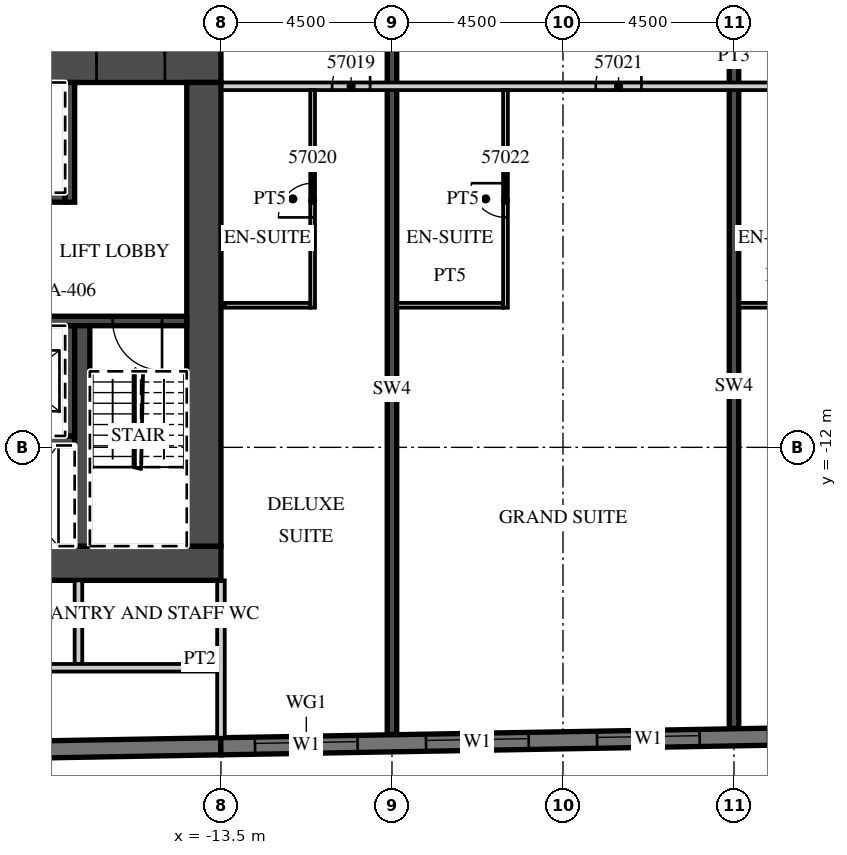
"""IFC4 building model, lengths in metres.
Left out: names, types, materials, properties, quantities, classifications, styles, units other than length and angle.
Written with IfcOpenShell. Run it as: python <this file> out.ifc"""

import sys

from ifc_helpers import new_model, si_unit, direction, frame, frame_2d, origin, place, context, subcontext, project, spatial, rectangle, extrude, element, fill, save


model = new_model("IFC4")
c1 = context("Model", 3, precision=1e-05, world=origin(), true_north=direction((0.0, 1.0)))
c2 = subcontext(c1, "Body", "Model", "MODEL_VIEW")
j1 = project(units=[si_unit("LENGTHUNIT", "METRE"), si_unit("PLANEANGLEUNIT", "RADIAN")], contexts=[c1])
p1 = place(None, origin())
s1 = spatial("IfcSite", under=j1, at=p1, CompositionType="ELEMENT")
p2 = place(p1, origin())
s2 = spatial("IfcBuilding", under=s1, at=p2, CompositionType="ELEMENT")
p3 = place(p2, frame((0.0, 0.0, 234.2)))
s3 = spatial("IfcBuildingStorey", under=s2, at=p3, CompositionType="ELEMENT", Elevation=234.2)
p4 = place(p3, frame((-9.0, -19.55, 0.0), z_axis=(0.0, 0.0, 1.0), x_axis=(0.0, 1.0, 0.0)))
e1 = element("IfcWall", 1, at=p4, inside=s3, PredefinedType="SHEAR", context=c2, shape_type="SweptSolid", body=[
    extrude(rectangle(XDim=18.15, YDim=0.25, at=frame_2d((9.075, 0.0))), origin(), (0.0, 0.0, 1.0), 3.3),
])
p5 = place(p3, frame((0.0, -19.393, 0.0), z_axis=(0.0, 0.0, 1.0), x_axis=(0.0, 1.0, 0.0)))
e2 = element("IfcWall", 2, at=p5, inside=s3, PredefinedType="SHEAR", context=c2, shape_type="SweptSolid", body=[
    extrude(rectangle(XDim=17.993, YDim=0.25, at=frame_2d((8.997, 0.0))), origin(), (0.0, 0.0, 1.0), 3.3),
])
p6 = place(p3, frame((-31.504, -20.18, 0.0), z_axis=(0.0, 0.0, 1.0), x_axis=(0.999847677887, 0.017453395744, 0.0)))
e3 = element("IfcWall", 3, at=p6, inside=s3, PredefinedType="SOLIDWALL", context=c2, shape_type="SweptSolid", body=[
    extrude(rectangle(XDim=18.003, YDim=0.45, at=frame_2d((9.001, 0.0))), origin(), (0.0, 0.0, 1.0), 3.02),
])
p7 = place(p3, frame((-13.504, -19.866, 0.0), z_axis=(0.0, 0.0, 1.0), x_axis=(0.999847672978, 0.017453676992, 0.0)))
e4 = element("IfcWall", 4, at=p7, inside=s3, PredefinedType="SOLIDWALL", context=c2, shape_type="SweptSolid", body=[
    extrude(rectangle(XDim=52.86, YDim=0.45, at=frame_2d((26.43, 0.0))), origin(), (0.0, 0.0, 1.0), 3.02),
])
p8 = place(p7, frame((0.9, 0.0, 0.45)))
e5 = element("IfcOpeningElement", 5, at=p8, cuts=e4, PredefinedType="OPENING", context=c2, shape_type="SweptSolid", body=[
    extrude(rectangle(XDim=2.7, YDim=2.25, at=frame_2d((1.35, 1.125))), frame((0.0, 0.235, 0.0), z_axis=(0.0, -1.0, 0.0), x_axis=(1.0, 0.0, 0.0)), (0.0, 0.0, 1.0), 0.47),
])
p9 = place(p7, frame((5.401, 0.0, 0.45)))
e6 = element("IfcOpeningElement", 6, at=p9, cuts=e4, PredefinedType="OPENING", context=c2, shape_type="SweptSolid", body=[
    extrude(rectangle(XDim=2.7, YDim=2.25, at=frame_2d((1.35, 1.125))), frame((0.0, 0.235, 0.0), z_axis=(0.0, -1.0, 0.0), x_axis=(1.0, 0.0, 0.0)), (0.0, 0.0, 1.0), 0.47),
])
p10 = place(p7, frame((9.902, 0.0, 0.45)))
e7 = element("IfcOpeningElement", 7, at=p10, cuts=e4, PredefinedType="OPENING", context=c2, shape_type="SweptSolid", body=[
    extrude(rectangle(XDim=2.7, YDim=2.25, at=frame_2d((1.35, 1.125))), frame((0.0, 0.235, 0.0), z_axis=(0.0, -1.0, 0.0), x_axis=(1.0, 0.0, 0.0)), (0.0, 0.0, 1.0), 0.47),
])
p11 = place(p7, frame((14.402, 0.0, 0.45)))
e8 = element("IfcOpeningElement", 8, at=p11, cuts=e4, PredefinedType="OPENING", context=c2, shape_type="SweptSolid", body=[
    extrude(rectangle(XDim=2.7, YDim=2.25, at=frame_2d((1.35, 1.125))), frame((0.0, 0.235, 0.0), z_axis=(0.0, -1.0, 0.0), x_axis=(1.0, 0.0, 0.0)), (0.0, 0.0, 1.0), 0.47),
])
p12 = place(p7, frame((18.903, 0.0, 0.45)))
e9 = element("IfcOpeningElement", 9, at=p12, cuts=e4, PredefinedType="OPENING", context=c2, shape_type="SweptSolid", body=[
    extrude(rectangle(XDim=2.7, YDim=2.25, at=frame_2d((1.35, 1.125))), frame((0.0, 0.235, 0.0), z_axis=(0.0, -1.0, 0.0), x_axis=(1.0, 0.0, 0.0)), (0.0, 0.0, 1.0), 0.47),
])
p13 = place(p7, frame((23.404, 0.0, 0.45)))
e10 = element("IfcOpeningElement", 10, at=p13, cuts=e4, PredefinedType="OPENING", context=c2, shape_type="SweptSolid", body=[
    extrude(rectangle(XDim=2.7, YDim=2.25, at=frame_2d((1.35, 1.125))), frame((0.0, 0.235, 0.0), z_axis=(0.0, -1.0, 0.0), x_axis=(1.0, 0.0, 0.0)), (0.0, 0.0, 1.0), 0.47),
])
p14 = place(p7, frame((27.904, 0.0, 0.45)))
e11 = element("IfcOpeningElement", 11, at=p14, cuts=e4, PredefinedType="OPENING", context=c2, shape_type="SweptSolid", body=[
    extrude(rectangle(XDim=2.7, YDim=2.25, at=frame_2d((1.35, 1.125))), frame((0.0, 0.235, 0.0), z_axis=(0.0, -1.0, 0.0), x_axis=(1.0, 0.0, 0.0)), (0.0, 0.0, 1.0), 0.47),
])
p15 = place(p7, frame((32.405, 0.0, 0.45)))
e12 = element("IfcOpeningElement", 12, at=p15, cuts=e4, PredefinedType="OPENING", context=c2, shape_type="SweptSolid", body=[
    extrude(rectangle(XDim=2.7, YDim=2.25, at=frame_2d((1.35, 1.125))), frame((0.0, 0.235, 0.0), z_axis=(0.0, -1.0, 0.0), x_axis=(1.0, 0.0, 0.0)), (0.0, 0.0, 1.0), 0.47),
])
p16 = place(p7, frame((36.906, 0.0, 0.45)))
e13 = element("IfcOpeningElement", 13, at=p16, cuts=e4, PredefinedType="OPENING", context=c2, shape_type="SweptSolid", body=[
    extrude(rectangle(XDim=2.7, YDim=2.25, at=frame_2d((1.35, 1.125))), frame((0.0, 0.235, 0.0), z_axis=(0.0, -1.0, 0.0), x_axis=(1.0, 0.0, 0.0)), (0.0, 0.0, 1.0), 0.47),
])
p17 = place(p7, frame((41.406, 0.0, 0.45)))
e14 = element("IfcOpeningElement", 14, at=p17, cuts=e4, PredefinedType="OPENING", context=c2, shape_type="SweptSolid", body=[
    extrude(rectangle(XDim=2.7, YDim=2.25, at=frame_2d((1.35, 1.125))), frame((0.0, 0.235, 0.0), z_axis=(0.0, -1.0, 0.0), x_axis=(1.0, 0.0, 0.0)), (0.0, 0.0, 1.0), 0.47),
])
p18 = place(p7, frame((45.907, 0.0, 0.45)))
e15 = element("IfcOpeningElement", 15, at=p18, cuts=e4, PredefinedType="OPENING", context=c2, shape_type="SweptSolid", body=[
    extrude(rectangle(XDim=2.7, YDim=2.25, at=frame_2d((1.35, 1.125))), frame((0.0, 0.235, 0.0), z_axis=(0.0, -1.0, 0.0), x_axis=(1.0, 0.0, 0.0)), (0.0, 0.0, 1.0), 0.47),
])
p19 = place(p3, frame((-13.5, -19.641, 0.0), z_axis=(0.0, 0.0, 1.0), x_axis=(0.0, 1.0, 0.0)))
e16 = element("IfcWall", 16, at=p19, inside=s3, PredefinedType="PARTITIONING", context=c2, shape_type="SweptSolid", body=[
    extrude(rectangle(XDim=4.141, YDim=0.2, at=frame_2d((2.071, 0.0))), origin(), (0.0, 0.0, 1.0), 3.02),
])
p20 = place(p3, frame((-13.5, -2.5, 0.0), z_axis=(0.0, 0.0, 1.0), x_axis=(1.0, 0.0, 0.0)))
e17 = element("IfcWall", 17, at=p20, inside=s3, PredefinedType="PARTITIONING", context=c2, shape_type="SweptSolid", body=[
    extrude(rectangle(XDim=27.0, YDim=0.2, at=frame_2d((13.5, 0.0))), origin(), (0.0, 0.0, 1.0), 3.02),
])
p21 = place(p20, frame((2.925, 0.0, 0.0)))
e18 = element("IfcOpeningElement", 18, at=p21, cuts=e17, PredefinedType="OPENING", context=c2, shape_type="SweptSolid", body=[
    extrude(rectangle(XDim=1.0, YDim=2.1, at=frame_2d((0.5, 1.05))), frame((0.0, 0.11, 0.0), z_axis=(0.0, -1.0, 0.0), x_axis=(1.0, 0.0, 0.0)), (0.0, 0.0, 1.0), 0.22),
])
p22 = place(p20, frame((9.863, 0.0, 0.0)))
e19 = element("IfcOpeningElement", 19, at=p22, cuts=e17, PredefinedType="OPENING", context=c2, shape_type="SweptSolid", body=[
    extrude(rectangle(XDim=1.2, YDim=2.1, at=frame_2d((0.6, 1.05))), frame((0.0, 0.11, 0.0), z_axis=(0.0, -1.0, 0.0), x_axis=(1.0, 0.0, 0.0)), (0.0, 0.0, 1.0), 0.22),
])
p23 = place(p20, frame((16.45, 0.0, 0.0)))
e20 = element("IfcOpeningElement", 20, at=p23, cuts=e17, PredefinedType="OPENING", context=c2, shape_type="SweptSolid", body=[
    extrude(rectangle(XDim=1.0, YDim=2.1, at=frame_2d((0.5, 1.05))), frame((0.0, 0.11, 0.0), z_axis=(0.0, -1.0, 0.0), x_axis=(1.0, 0.0, 0.0)), (0.0, 0.0, 1.0), 0.22),
])
p24 = place(p20, frame((20.925, 0.0, 0.0)))
e21 = element("IfcOpeningElement", 21, at=p24, cuts=e17, PredefinedType="OPENING", context=c2, shape_type="SweptSolid", body=[
    extrude(rectangle(XDim=1.0, YDim=2.1, at=frame_2d((0.5, 1.05))), frame((0.0, 0.11, 0.0), z_axis=(0.0, -1.0, 0.0), x_axis=(1.0, 0.0, 0.0)), (0.0, 0.0, 1.0), 0.22),
])
p25 = place(p20, frame((25.425, 0.0, 0.0)))
e22 = element("IfcOpeningElement", 22, at=p25, cuts=e17, PredefinedType="OPENING", context=c2, shape_type="SweptSolid", body=[
    extrude(rectangle(XDim=1.0, YDim=2.1, at=frame_2d((0.5, 1.05))), frame((0.0, 0.11, 0.0), z_axis=(0.0, -1.0, 0.0), x_axis=(1.0, 0.0, 0.0)), (0.0, 0.0, 1.0), 0.22),
])
p26 = place(p3, frame((-11.088, -8.325, 0.0), z_axis=(0.0, 0.0, 1.0), x_axis=(0.0, 1.0, 0.0)))
e23 = element("IfcWall", 23, at=p26, inside=s3, PredefinedType="PARTITIONING", context=c2, shape_type="SweptSolid", body=[
    extrude(rectangle(XDim=5.725, YDim=0.125, at=frame_2d((2.862, 0.0))), origin(), (0.0, 0.0, 1.0), 3.02),
])
p27 = place(p26, frame((2.375, 0.0, 0.0)))
e24 = element("IfcOpeningElement", 24, at=p27, cuts=e23, PredefinedType="OPENING", context=c2, shape_type="SweptSolid", body=[
    extrude(rectangle(XDim=0.9, YDim=2.1, at=frame_2d((0.45, 1.05))), frame((0.0, 0.073, 0.0), z_axis=(0.0, -1.0, 0.0), x_axis=(1.0, 0.0, 0.0)), (0.0, 0.0, 1.0), 0.145),
])
p28 = place(p3, frame((-13.4, -8.262, 0.0), z_axis=(0.0, 0.0, 1.0), x_axis=(1.0, 0.0, 0.0)))
e25 = element("IfcWall", 25, at=p28, inside=s3, PredefinedType="PARTITIONING", context=c2, shape_type="SweptSolid", body=[
    extrude(rectangle(XDim=2.25, YDim=0.125, at=frame_2d((1.125, 0.0))), origin(), (0.0, 0.0, 1.0), 3.02),
])
p29 = place(p3, frame((-6.013, -8.325, 0.0), z_axis=(0.0, 0.0, 1.0), x_axis=(0.0, 1.0, 0.0)))
e26 = element("IfcWall", 26, at=p29, inside=s3, PredefinedType="PARTITIONING", context=c2, shape_type="SweptSolid", body=[
    extrude(rectangle(XDim=5.725, YDim=0.125, at=frame_2d((2.862, 0.0))), origin(), (0.0, 0.0, 1.0), 3.02),
])
p30 = place(p29, frame((2.375, 0.0, 0.0)))
e27 = element("IfcOpeningElement", 27, at=p30, cuts=e26, PredefinedType="OPENING", context=c2, shape_type="SweptSolid", body=[
    extrude(rectangle(XDim=0.9, YDim=2.1, at=frame_2d((0.45, 1.05))), frame((0.0, 0.073, 0.0), z_axis=(0.0, -1.0, 0.0), x_axis=(1.0, 0.0, 0.0)), (0.0, 0.0, 1.0), 0.145),
])
p31 = place(p3, frame((-8.875, -8.262, 0.0), z_axis=(0.0, 0.0, 1.0), x_axis=(1.0, 0.0, 0.0)))
e28 = element("IfcWall", 28, at=p31, inside=s3, PredefinedType="PARTITIONING", context=c2, shape_type="SweptSolid", body=[
    extrude(rectangle(XDim=2.8, YDim=0.125, at=frame_2d((1.4, 0.0))), origin(), (0.0, 0.0, 1.0), 3.02),
])
p32 = place(p3, frame((0.125, -8.262, 0.0), z_axis=(0.0, 0.0, 1.0), x_axis=(1.0, 0.0, 0.0)))
e29 = element("IfcWall", 29, at=p32, inside=s3, PredefinedType="PARTITIONING", context=c2, shape_type="SweptSolid", body=[
    extrude(rectangle(XDim=2.25, YDim=0.125, at=frame_2d((1.125, 0.0))), origin(), (0.0, 0.0, 1.0), 3.02),
])
p33 = place(p3, frame((-31.5, -1.95, 0.0), z_axis=(0.0, 0.0, 1.0), x_axis=(1.0, 0.0, 0.0)))
e30 = element("IfcWall", 30, at=p33, inside=s3, PredefinedType="SHEAR", context=c2, shape_type="SweptSolid", body=[
    extrude(rectangle(XDim=18.0, YDim=0.9, at=frame_2d((9.0, 0.0))), origin(), (0.0, 0.0, 1.0), 3.02),
])
p34 = place(p33, frame((14.725, 0.0, 0.0)))
e31 = element("IfcOpeningElement", 31, at=p34, cuts=e30, PredefinedType="OPENING", context=c2, shape_type="SweptSolid", body=[
    extrude(rectangle(XDim=1.8, YDim=2.1, at=frame_2d((0.9, 1.05))), frame((0.0, 0.46, 0.0), z_axis=(0.0, -1.0, 0.0), x_axis=(1.0, 0.0, 0.0)), (0.0, 0.0, 1.0), 0.92),
])
p35 = place(p3, frame((-20.3, -15.05, 0.0), z_axis=(0.0, 0.0, 1.0), x_axis=(1.0, 0.0, 0.0)))
e32 = element("IfcWall", 32, at=p35, inside=s3, PredefinedType="SHEAR", context=c2, shape_type="SweptSolid", body=[
    extrude(rectangle(XDim=6.8, YDim=0.9, at=frame_2d((3.4, 0.0))), origin(), (0.0, 0.0, 1.0), 3.02),
])
p36 = place(p35, frame((0.875, 0.0, 0.0)))
e33 = element("IfcOpeningElement", 33, at=p36, cuts=e32, PredefinedType="OPENING", context=c2, shape_type="SweptSolid", body=[
    extrude(rectangle(XDim=1.2, YDim=2.1, at=frame_2d((0.6, 1.05))), frame((0.0, 0.46, 0.0), z_axis=(0.0, -1.0, 0.0), x_axis=(1.0, 0.0, 0.0)), (0.0, 0.0, 1.0), 0.92),
])
p37 = place(p3, frame((-13.95, -14.6, 0.0), z_axis=(0.0, 0.0, 1.0), x_axis=(0.0, 1.0, 0.0)))
e34 = element("IfcWall", 34, at=p37, inside=s3, PredefinedType="SHEAR", context=c2, shape_type="SweptSolid", body=[
    extrude(rectangle(XDim=12.2, YDim=0.9, at=frame_2d((6.1, 0.0))), origin(), (0.0, 0.0, 1.0), 3.02),
])
p38 = place(p3, frame((-30.6, -5.425, 0.0), z_axis=(0.0, 0.0, 1.0), x_axis=(1.0, 0.0, 0.0)))
e35 = element("IfcWall", 35, at=p38, inside=s3, PredefinedType="SHEAR", context=c2, shape_type="SweptSolid", body=[
    extrude(rectangle(XDim=13.0, YDim=0.25, at=frame_2d((6.5, 0.0))), origin(), (0.0, 0.0, 1.0), 3.02),
])
p39 = place(p38, frame((3.325, 0.0, 0.0)))
e36 = element("IfcOpeningElement", 36, at=p39, cuts=e35, PredefinedType="OPENING", context=c2, shape_type="SweptSolid", body=[
    extrude(rectangle(XDim=1.2, YDim=2.1, at=frame_2d((0.6, 1.05))), frame((0.0, 0.135, 0.0), z_axis=(0.0, -1.0, 0.0), x_axis=(1.0, 0.0, 0.0)), (0.0, 0.0, 1.0), 0.27),
])
p40 = place(p38, frame((5.925, 0.0, 0.0)))
e37 = element("IfcOpeningElement", 37, at=p40, cuts=e35, PredefinedType="OPENING", context=c2, shape_type="SweptSolid", body=[
    extrude(rectangle(XDim=1.2, YDim=2.1, at=frame_2d((0.6, 1.05))), frame((0.0, 0.135, 0.0), z_axis=(0.0, -1.0, 0.0), x_axis=(1.0, 0.0, 0.0)), (0.0, 0.0, 1.0), 0.27),
])
p41 = place(p3, frame((-17.475, -5.55, 0.0), z_axis=(0.0, 0.0, 1.0), x_axis=(0.0, 1.0, 0.0)))
e38 = element("IfcWall", 38, at=p41, inside=s3, PredefinedType="SHEAR", context=c2, shape_type="SweptSolid", body=[
    extrude(rectangle(XDim=3.15, YDim=0.25, at=frame_2d((1.575, 0.0))), origin(), (0.0, 0.0, 1.0), 3.02),
])
p42 = place(p3, frame((-30.6, -8.675, 0.0), z_axis=(0.0, 0.0, 1.0), x_axis=(1.0, 0.0, 0.0)))
e39 = element("IfcWall", 39, at=p42, inside=s3, PredefinedType="SHEAR", context=c2, shape_type="SweptSolid", body=[
    extrude(rectangle(XDim=16.2, YDim=0.25, at=frame_2d((8.1, 0.0))), origin(), (0.0, 0.0, 1.0), 3.02),
])
p43 = place(p42, frame((8.55, 0.0, 0.0)))
e40 = element("IfcOpeningElement", 40, at=p43, cuts=e39, PredefinedType="OPENING", context=c2, shape_type="SweptSolid", body=[
    extrude(rectangle(XDim=1.2, YDim=2.1, at=frame_2d((0.6, 1.05))), frame((0.0, 0.135, 0.0), z_axis=(0.0, -1.0, 0.0), x_axis=(1.0, 0.0, 0.0)), (0.0, 0.0, 1.0), 0.27),
])
p44 = place(p42, frame((11.2, 0.0, 0.0)))
e41 = element("IfcOpeningElement", 41, at=p44, cuts=e39, PredefinedType="OPENING", context=c2, shape_type="SweptSolid", body=[
    extrude(rectangle(XDim=1.2, YDim=2.1, at=frame_2d((0.6, 1.05))), frame((0.0, 0.135, 0.0), z_axis=(0.0, -1.0, 0.0), x_axis=(1.0, 0.0, 0.0)), (0.0, 0.0, 1.0), 0.27),
])
p45 = place(p42, frame((14.25, 0.0, 0.0)))
e42 = element("IfcOpeningElement", 42, at=p45, cuts=e39, PredefinedType="OPENING", context=c2, shape_type="SweptSolid", body=[
    extrude(rectangle(XDim=1.3, YDim=2.1, at=frame_2d((0.65, 1.05))), frame((0.0, 0.135, 0.0), z_axis=(0.0, -1.0, 0.0), x_axis=(1.0, 0.0, 0.0)), (0.0, 0.0, 1.0), 0.27),
])
p46 = place(p42, frame((1.288, 0.0, 0.0)))
e43 = element("IfcOpeningElement", 43, at=p46, cuts=e39, PredefinedType="OPENING", context=c2, shape_type="SweptSolid", body=[
    extrude(rectangle(XDim=1.0, YDim=2.1, at=frame_2d((0.5, 1.05))), frame((0.0, 0.135, 0.0), z_axis=(0.0, -1.0, 0.0), x_axis=(1.0, 0.0, 0.0)), (0.0, 0.0, 1.0), 0.27),
])
p47 = place(p42, frame((5.262, 0.0, 0.0)))
e44 = element("IfcOpeningElement", 44, at=p47, cuts=e39, PredefinedType="OPENING", context=c2, shape_type="SweptSolid", body=[
    extrude(rectangle(XDim=1.0, YDim=2.1, at=frame_2d((0.5, 1.05))), frame((0.0, 0.135, 0.0), z_axis=(0.0, -1.0, 0.0), x_axis=(1.0, 0.0, 0.0)), (0.0, 0.0, 1.0), 0.27),
])
p48 = place(p3, frame((-30.6, -11.825, 0.0), z_axis=(0.0, 0.0, 1.0), x_axis=(1.0, 0.0, 0.0)))
e45 = element("IfcWall", 45, at=p48, inside=s3, PredefinedType="SHEAR", context=c2, shape_type="SweptSolid", body=[
    extrude(rectangle(XDim=13.25, YDim=0.25, at=frame_2d((6.625, 0.0))), origin(), (0.0, 0.0, 1.0), 3.02),
])
p49 = place(p3, frame((-17.475, -11.7, 0.0), z_axis=(0.0, 0.0, 1.0), x_axis=(0.0, 1.0, 0.0)))
e46 = element("IfcWall", 46, at=p49, inside=s3, PredefinedType="SHEAR", context=c2, shape_type="SweptSolid", body=[
    extrude(rectangle(XDim=2.9, YDim=0.25, at=frame_2d((1.45, 0.0))), origin(), (0.0, 0.0, 1.0), 3.02),
])
p50 = place(p3, frame((-17.15, -14.6, 0.0), z_axis=(0.0, 0.0, 1.0), x_axis=(0.0, 1.0, 0.0)))
e47 = element("IfcWall", 47, at=p50, inside=s3, PredefinedType="SHEAR", context=c2, shape_type="SweptSolid", body=[
    extrude(rectangle(XDim=5.8, YDim=0.4, at=frame_2d((2.9, 0.0))), origin(), (0.0, 0.0, 1.0), 3.02),
])
p51 = place(p3, frame((-17.25, -17.7, 0.0), z_axis=(0.0, 0.0, 1.0), x_axis=(0.0, 1.0, 0.0)))
e48 = element("IfcWall", 48, at=p51, inside=s3, PredefinedType="PARTITIONING", context=c2, shape_type="SweptSolid", body=[
    extrude(rectangle(XDim=2.2, YDim=0.2, at=frame_2d((1.1, 0.0))), origin(), (0.0, 0.0, 1.0), 3.02),
])
p52 = place(p3, frame((-35.864, -17.8, 0.0), z_axis=(0.0, 0.0, 1.0), x_axis=(1.0, 0.0, 0.0)))
e49 = element("IfcWall", 49, at=p52, inside=s3, PredefinedType="PARTITIONING", context=c2, shape_type="SweptSolid", body=[
    extrude(rectangle(XDim=22.264, YDim=0.2, at=frame_2d((11.132, 0.0))), origin(), (0.0, 0.0, 1.0), 3.02),
])
p53 = place(p52, frame((6.351, 0.0, 0.0)))
e50 = element("IfcOpeningElement", 50, at=p53, cuts=e49, PredefinedType="OPENING", context=c2, shape_type="SweptSolid", body=[
    extrude(rectangle(XDim=0.9, YDim=2.1, at=frame_2d((0.45, 1.05))), frame((0.0, 0.11, 0.0), z_axis=(0.0, -1.0, 0.0), x_axis=(1.0, 0.0, 0.0)), (0.0, 0.0, 1.0), 0.22),
])
p54 = place(p52, frame((14.651, 0.0, 0.0)))
e51 = element("IfcOpeningElement", 51, at=p54, cuts=e49, PredefinedType="OPENING", context=c2, shape_type="SweptSolid", body=[
    extrude(rectangle(XDim=0.9, YDim=2.1, at=frame_2d((0.45, 1.05))), frame((0.0, 0.11, 0.0), z_axis=(0.0, -1.0, 0.0), x_axis=(1.0, 0.0, 0.0)), (0.0, 0.0, 1.0), 0.22),
])
p55 = place(p8, origin())
e52 = element("IfcWindow", 52, at=p55, inside=s3, PartitioningType="SINGLE_PANEL", PredefinedType="WINDOW", context=c2, shape_type="SweptSolid", body=[
    extrude(rectangle(XDim=2.7, YDim=2.25, at=frame_2d((1.35, 1.125))), frame((0.0, 0.09, 0.0), z_axis=(0.0, -1.0, 0.0), x_axis=(1.0, 0.0, 0.0)), (0.0, 0.0, 1.0), 0.06),
])
fill(e5, e52)
p56 = place(p9, origin())
e53 = element("IfcWindow", 53, at=p56, inside=s3, PartitioningType="SINGLE_PANEL", PredefinedType="WINDOW", context=c2, shape_type="SweptSolid", body=[
    extrude(rectangle(XDim=2.7, YDim=2.25, at=frame_2d((1.35, 1.125))), frame((0.0, 0.09, 0.0), z_axis=(0.0, -1.0, 0.0), x_axis=(1.0, 0.0, 0.0)), (0.0, 0.0, 1.0), 0.06),
])
fill(e6, e53)
p57 = place(p10, origin())
e54 = element("IfcWindow", 54, at=p57, inside=s3, PartitioningType="SINGLE_PANEL", PredefinedType="WINDOW", context=c2, shape_type="SweptSolid", body=[
    extrude(rectangle(XDim=2.7, YDim=2.25, at=frame_2d((1.35, 1.125))), frame((0.0, 0.09, 0.0), z_axis=(0.0, -1.0, 0.0), x_axis=(1.0, 0.0, 0.0)), (0.0, 0.0, 1.0), 0.06),
])
fill(e7, e54)
p58 = place(p21, origin())
e55 = element("IfcDoor", 55, at=p58, inside=s3, OperationType="SINGLE_SWING_RIGHT", PredefinedType="DOOR", context=c2, shape_type="SweptSolid", body=[
    extrude(rectangle(XDim=1.0, YDim=2.1, at=frame_2d((0.5, 1.05))), frame((0.0, 0.025, 0.0), z_axis=(0.0, -1.0, 0.0), x_axis=(1.0, 0.0, 0.0)), (0.0, 0.0, 1.0), 0.05),
])
fill(e18, e55)
p59 = place(p27, origin())
e56 = element("IfcDoor", 56, at=p59, inside=s3, OperationType="SINGLE_SWING_LEFT", PredefinedType="DOOR", context=c2, shape_type="SweptSolid", body=[
    extrude(rectangle(XDim=0.9, YDim=2.1, at=frame_2d((0.45, 1.05))), frame((0.0, 0.025, 0.0), z_axis=(0.0, -1.0, 0.0), x_axis=(1.0, 0.0, 0.0)), (0.0, 0.0, 1.0), 0.05),
])
fill(e24, e56)
p60 = place(p22, origin())
e57 = element("IfcDoor", 57, at=p60, inside=s3, OperationType="SINGLE_SWING_RIGHT", PredefinedType="DOOR", context=c2, shape_type="SweptSolid", body=[
    extrude(rectangle(XDim=1.2, YDim=2.1, at=frame_2d((0.6, 1.05))), frame((0.0, 0.025, 0.0), z_axis=(0.0, -1.0, 0.0), x_axis=(1.0, 0.0, 0.0)), (0.0, 0.0, 1.0), 0.05),
])
fill(e19, e57)
p61 = place(p30, origin())
e58 = element("IfcDoor", 58, at=p61, inside=s3, OperationType="SINGLE_SWING_RIGHT", PredefinedType="DOOR", context=c2, shape_type="SweptSolid", body=[
    extrude(rectangle(XDim=0.9, YDim=2.1, at=frame_2d((0.45, 1.05))), frame((0.0, 0.025, 0.0), z_axis=(0.0, -1.0, 0.0), x_axis=(1.0, 0.0, 0.0)), (0.0, 0.0, 1.0), 0.05),
])
fill(e27, e58)
p62 = place(p34, origin())
e59 = element("IfcDoor", 59, at=p62, inside=s3, OperationType="DOUBLE_DOOR_DOUBLE_SWING", PredefinedType="DOOR", context=c2, shape_type="SweptSolid", body=[
    extrude(rectangle(XDim=1.8, YDim=2.1, at=frame_2d((0.9, 1.05))), frame((0.0, 0.025, 0.0), z_axis=(0.0, -1.0, 0.0), x_axis=(1.0, 0.0, 0.0)), (0.0, 0.0, 1.0), 0.05),
])
fill(e31, e59)
p63 = place(p45, origin())
e60 = element("IfcDoor", 60, at=p63, inside=s3, OperationType="SINGLE_SWING_RIGHT", PredefinedType="DOOR", context=c2, shape_type="SweptSolid", body=[
    extrude(rectangle(XDim=1.3, YDim=2.1, at=frame_2d((0.65, 1.05))), frame((0.0, 0.025, 0.0), z_axis=(0.0, -1.0, 0.0), x_axis=(1.0, 0.0, 0.0)), (0.0, 0.0, 1.0), 0.05),
])
fill(e42, e60)
save(model, sys.argv[1])
